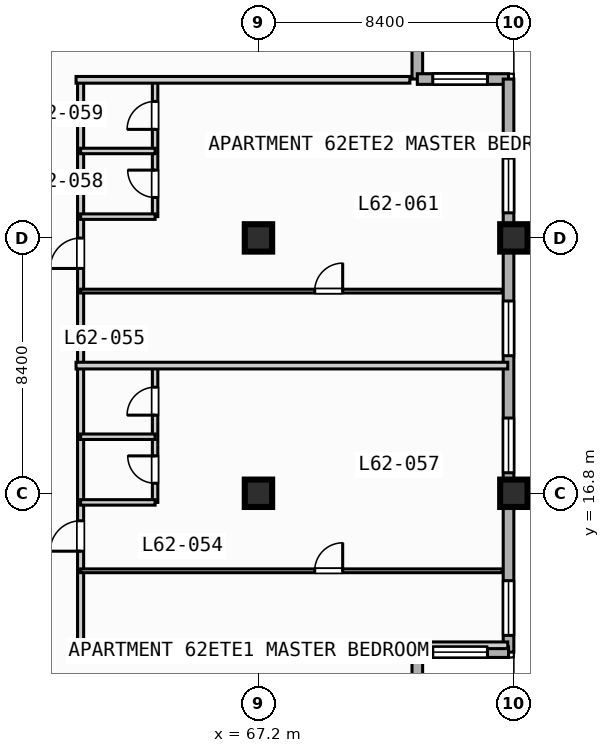
"""IFC4 building model, lengths in metres.
Left out: names, types, materials, properties, quantities, classifications, styles, units other than length and angle.
Written with IfcOpenShell. Run it as: python <this file> out.ifc"""

import sys

from ifc_helpers import new_model, si_unit, direction, frame, frame_2d, origin, origin_2d, place, context, subcontext, project, spatial, rectangle, extrude, element, fill, save


model = new_model("IFC4")
c1 = context("Model", 3, precision=1e-05, world=origin(), true_north=direction((0.0, 1.0)))
c2 = subcontext(c1, "Body", "Model", "MODEL_VIEW")
j1 = project(units=[si_unit("LENGTHUNIT", "METRE"), si_unit("PLANEANGLEUNIT", "RADIAN")], contexts=[c1])
p1 = place(None, origin())
s1 = spatial("IfcSite", under=j1, at=p1, CompositionType="ELEMENT")
p2 = place(p1, origin())
s2 = spatial("IfcBuilding", under=s1, at=p2, CompositionType="ELEMENT")
p3 = place(p2, frame((0.0, 0.0, 252.7)))
s3 = spatial("IfcBuildingStorey", under=s2, at=p3, CompositionType="ELEMENT", Elevation=252.7)
for number, where, z_axis, x_axis in (
    (1, (67.2, 16.8, 0.0), (0.0, 0.0, 1.0), (1.0, 0.0, 0.0)),
    (2, (67.2, 25.2, 0.0), (0.0, 0.0, 1.0), (1.0, 0.0, 0.0)),
    (3, (75.6, 16.8, 0.0), (0.0, 0.0, 1.0), (1.0, 0.0, 0.0)),
    (4, (75.6, 25.2, 0.0), (0.0, 0.0, 1.0), (1.0, 0.0, 0.0)),
):
    element("IfcColumn", number, at=place(p3, frame(where, z_axis=z_axis, x_axis=x_axis)), inside=s3, PredefinedType="COLUMN", context=c2, shape_type="SweptSolid", body=[
        extrude(rectangle(XDim=0.9, YDim=0.9, at=origin_2d()), origin(), (0.0, 0.0, 1.0), 3.7),
    ])
p4 = place(p3, frame((72.425, 33.425, 0.0), z_axis=(0.0, 0.0, 1.0), x_axis=(0.0, -1.0, 0.0)))
e5 = element("IfcWall", 5, at=p4, inside=s3, PredefinedType="STANDARD", context=c2, shape_type="SweptSolid", body=[
    extrude(rectangle(XDim=3.0, YDim=0.35, at=frame_2d((1.5, 0.0))), origin(), (0.0, 0.0, 1.0), 3.47),
])
p5 = place(p3, frame((72.425, 30.425, 0.0), z_axis=(0.0, 0.0, 1.0), x_axis=(1.0, 0.0, 0.0)))
e6 = element("IfcWall", 6, at=p5, inside=s3, PredefinedType="STANDARD", context=c2, shape_type="SweptSolid", body=[
    extrude(rectangle(XDim=3.0, YDim=0.35, at=frame_2d((1.5, 0.0))), origin(), (0.0, 0.0, 1.0), 3.47),
])
p6 = place(p5, frame((0.508, 0.0, 0.85)))
e7 = element("IfcOpeningElement", 7, at=p6, cuts=e6, PredefinedType="OPENING", context=c2, shape_type="SweptSolid", body=[
    extrude(rectangle(XDim=1.8, YDim=1.8, at=frame_2d((0.9, 0.9))), frame((0.0, 0.185, 0.0), z_axis=(0.0, -1.0, 0.0), x_axis=(1.0, 0.0, 0.0)), (0.0, 0.0, 1.0), 0.37),
])
p7 = place(p3, frame((75.425, 30.425, 0.0), z_axis=(0.0, 0.0, 1.0), x_axis=(0.0, -1.0, 0.0)))
e8 = element("IfcWall", 8, at=p7, inside=s3, PredefinedType="STANDARD", context=c2, shape_type="SweptSolid", body=[
    extrude(rectangle(XDim=18.85, YDim=0.35, at=frame_2d((9.425, 0.0))), origin(), (0.0, 0.0, 1.0), 3.47),
])
p8 = place(p7, frame((16.5, 0.0, 0.85)))
e9 = element("IfcOpeningElement", 9, at=p8, cuts=e8, PredefinedType="OPENING", context=c2, shape_type="SweptSolid", body=[
    extrude(rectangle(XDim=1.8, YDim=1.8, at=frame_2d((0.9, 0.9))), frame((0.0, 0.185, 0.0), z_axis=(0.0, -1.0, 0.0), x_axis=(1.0, 0.0, 0.0)), (0.0, 0.0, 1.0), 0.37),
])
p9 = place(p7, frame((11.15, 0.0, 0.85)))
e10 = element("IfcOpeningElement", 10, at=p9, cuts=e8, PredefinedType="OPENING", context=c2, shape_type="SweptSolid", body=[
    extrude(rectangle(XDim=1.8, YDim=1.8, at=frame_2d((0.9, 0.9))), frame((0.0, 0.185, 0.0), z_axis=(0.0, -1.0, 0.0), x_axis=(1.0, 0.0, 0.0)), (0.0, 0.0, 1.0), 0.37),
])
p10 = place(p7, frame((7.3, 0.0, 0.85)))
e11 = element("IfcOpeningElement", 11, at=p10, cuts=e8, PredefinedType="OPENING", context=c2, shape_type="SweptSolid", body=[
    extrude(rectangle(XDim=1.8, YDim=1.8, at=frame_2d((0.9, 0.9))), frame((0.0, 0.185, 0.0), z_axis=(0.0, -1.0, 0.0), x_axis=(1.0, 0.0, 0.0)), (0.0, 0.0, 1.0), 0.37),
])
p11 = place(p7, frame((2.6, 0.0, 0.85)))
e12 = element("IfcOpeningElement", 12, at=p11, cuts=e8, PredefinedType="OPENING", context=c2, shape_type="SweptSolid", body=[
    extrude(rectangle(XDim=1.8, YDim=1.8, at=frame_2d((0.9, 0.9))), frame((0.0, 0.185, 0.0), z_axis=(0.0, -1.0, 0.0), x_axis=(1.0, 0.0, 0.0)), (0.0, 0.0, 1.0), 0.37),
])
p12 = place(p3, frame((75.425, 11.575, 0.0), z_axis=(0.0, 0.0, 1.0), x_axis=(-1.0, 0.0, 0.0)))
e13 = element("IfcWall", 13, at=p12, inside=s3, PredefinedType="STANDARD", context=c2, shape_type="SweptSolid", body=[
    extrude(rectangle(XDim=3.0, YDim=0.35, at=frame_2d((1.5, 0.0))), origin(), (0.0, 0.0, 1.0), 3.47),
])
p13 = place(p12, frame((0.692, 0.0, 0.85)))
e14 = element("IfcOpeningElement", 14, at=p13, cuts=e13, PredefinedType="OPENING", context=c2, shape_type="SweptSolid", body=[
    extrude(rectangle(XDim=1.8, YDim=1.8, at=frame_2d((0.9, 0.9))), frame((0.0, 0.185, 0.0), z_axis=(0.0, -1.0, 0.0), x_axis=(1.0, 0.0, 0.0)), (0.0, 0.0, 1.0), 0.37),
])
p14 = place(p3, frame((72.425, 11.575, 0.0), z_axis=(0.0, 0.0, 1.0), x_axis=(0.0, -1.0, 0.0)))
e15 = element("IfcWall", 15, at=p14, inside=s3, PredefinedType="STANDARD", context=c2, shape_type="SweptSolid", body=[
    extrude(rectangle(XDim=3.0, YDim=0.35, at=frame_2d((1.5, 0.0))), origin(), (0.0, 0.0, 1.0), 3.47),
])
p15 = place(p3, frame((61.35, 11.8, 0.0), z_axis=(0.0, 0.0, 1.0), x_axis=(0.0, 1.0, 0.0)))
e16 = element("IfcWall", 16, at=p15, inside=s3, PredefinedType="PARTITIONING", context=c2, shape_type="SweptSolid", body=[
    extrude(rectangle(XDim=18.6, YDim=0.2, at=frame_2d((9.3, 0.0))), origin(), (0.0, 0.0, 1.0), 3.47),
])
p16 = place(p15, frame((3.095, 0.0, 0.0)))
e17 = element("IfcOpeningElement", 17, at=p16, cuts=e16, PredefinedType="OPENING", context=c2, shape_type="SweptSolid", body=[
    extrude(rectangle(XDim=1.0, YDim=2.15, at=frame_2d((0.5, 1.075))), frame((0.0, 0.11, 0.0), z_axis=(0.0, -1.0, 0.0), x_axis=(1.0, 0.0, 0.0)), (0.0, 0.0, 1.0), 0.22),
])
p17 = place(p15, frame((12.395, 0.0, 0.0)))
e18 = element("IfcOpeningElement", 18, at=p17, cuts=e16, PredefinedType="OPENING", context=c2, shape_type="SweptSolid", body=[
    extrude(rectangle(XDim=1.0, YDim=2.15, at=frame_2d((0.5, 1.075))), frame((0.0, 0.11, 0.0), z_axis=(0.0, -1.0, 0.0), x_axis=(1.0, 0.0, 0.0)), (0.0, 0.0, 1.0), 0.22),
])
p18 = place(p3, frame((61.2, 11.8, 0.0), z_axis=(0.0, 0.0, 1.0), x_axis=(1.0, 0.0, 0.0)))
e19 = element("IfcWall", 19, at=p18, inside=s3, PredefinedType="PARTITIONING", context=c2, shape_type="SweptSolid", body=[
    extrude(rectangle(XDim=14.2, YDim=0.22, at=frame_2d((7.1, 0.0))), origin(), (0.0, 0.0, 1.0), 3.47),
])
p19 = place(p3, frame((63.8, 16.5, 0.0), z_axis=(0.0, 0.0, 1.0), x_axis=(0.0, 1.0, 0.0)))
e20 = element("IfcWall", 20, at=p19, inside=s3, PredefinedType="PLUMBINGWALL", context=c2, shape_type="SweptSolid", body=[
    extrude(rectangle(XDim=4.5, YDim=0.18, at=frame_2d((2.25, 0.0))), origin(), (0.0, 0.0, 1.0), 3.47),
])
p20 = place(p19, frame((0.63, 0.0, 0.0)))
e21 = element("IfcOpeningElement", 21, at=p20, cuts=e20, PredefinedType="OPENING", context=c2, shape_type="SweptSolid", body=[
    extrude(rectangle(XDim=0.9, YDim=2.1, at=frame_2d((0.45, 1.05))), frame((0.0, 0.1, 0.0), z_axis=(0.0, -1.0, 0.0), x_axis=(1.0, 0.0, 0.0)), (0.0, 0.0, 1.0), 0.2),
])
p21 = place(p19, frame((2.87, 0.0, 0.0)))
e22 = element("IfcOpeningElement", 22, at=p21, cuts=e20, PredefinedType="OPENING", context=c2, shape_type="SweptSolid", body=[
    extrude(rectangle(XDim=0.92, YDim=2.1, at=frame_2d((0.46, 1.05))), frame((0.0, 0.1, 0.0), z_axis=(0.0, -1.0, 0.0), x_axis=(1.0, 0.0, 0.0)), (0.0, 0.0, 1.0), 0.2),
])
for number, where, z_axis, x_axis in (
    (23, (61.35, 16.5, 0.0), (0.0, 0.0, 1.0), (1.0, 0.0, 0.0)),
    (24, (61.35, 18.66, 0.0), (0.0, 0.0, 1.0), (1.0, 0.0, 0.0)),
):
    element("IfcWall", number, at=place(p3, frame(where, z_axis=z_axis, x_axis=x_axis)), inside=s3, PredefinedType="PLUMBINGWALL", context=c2, shape_type="SweptSolid", body=[
        extrude(rectangle(XDim=2.45, YDim=0.18, at=frame_2d((1.225, 0.0))), origin(), (0.0, 0.0, 1.0), 3.47),
    ])
p22 = place(p3, frame((61.35, 14.25, 0.0), z_axis=(0.0, 0.0, 1.0), x_axis=(1.0, 0.0, 0.0)))
e25 = element("IfcWall", 25, at=p22, inside=s3, PredefinedType="PARTITIONING", context=c2, shape_type="SweptSolid", body=[
    extrude(rectangle(XDim=13.87, YDim=0.125, at=frame_2d((6.935, 0.0))), origin(), (0.0, 0.0, 1.0), 3.47),
])
p23 = place(p22, frame((7.7, 0.0, 0.0)))
e26 = element("IfcOpeningElement", 26, at=p23, cuts=e25, PredefinedType="OPENING", context=c2, shape_type="SweptSolid", body=[
    extrude(rectangle(XDim=0.92, YDim=2.1, at=frame_2d((0.46, 1.05))), frame((0.0, 0.073, 0.0), z_axis=(0.0, -1.0, 0.0), x_axis=(1.0, 0.0, 0.0)), (0.0, 0.0, 1.0), 0.145),
])
p24 = place(p3, frame((61.2, 21.0, 0.0), z_axis=(0.0, 0.0, 1.0), x_axis=(1.0, 0.0, 0.0)))
e27 = element("IfcWall", 27, at=p24, inside=s3, PredefinedType="PARTITIONING", context=c2, shape_type="SweptSolid", body=[
    extrude(rectangle(XDim=14.2, YDim=0.22, at=frame_2d((7.1, 0.0))), origin(), (0.0, 0.0, 1.0), 3.47),
])
p25 = place(p3, frame((63.8, 25.9, 0.0), z_axis=(0.0, 0.0, 1.0), x_axis=(0.0, 1.0, 0.0)))
e28 = element("IfcWall", 28, at=p25, inside=s3, PredefinedType="PLUMBINGWALL", context=c2, shape_type="SweptSolid", body=[
    extrude(rectangle(XDim=4.5, YDim=0.18, at=frame_2d((2.25, 0.0))), origin(), (0.0, 0.0, 1.0), 3.47),
])
p26 = place(p25, frame((0.63, 0.0, 0.0)))
e29 = element("IfcOpeningElement", 29, at=p26, cuts=e28, PredefinedType="OPENING", context=c2, shape_type="SweptSolid", body=[
    extrude(rectangle(XDim=0.9, YDim=2.1, at=frame_2d((0.45, 1.05))), frame((0.0, 0.1, 0.0), z_axis=(0.0, -1.0, 0.0), x_axis=(1.0, 0.0, 0.0)), (0.0, 0.0, 1.0), 0.2),
])
p27 = place(p25, frame((2.87, 0.0, 0.0)))
e30 = element("IfcOpeningElement", 30, at=p27, cuts=e28, PredefinedType="OPENING", context=c2, shape_type="SweptSolid", body=[
    extrude(rectangle(XDim=0.92, YDim=2.1, at=frame_2d((0.46, 1.05))), frame((0.0, 0.1, 0.0), z_axis=(0.0, -1.0, 0.0), x_axis=(1.0, 0.0, 0.0)), (0.0, 0.0, 1.0), 0.2),
])
for number, where, z_axis, x_axis in (
    (31, (61.35, 25.9, 0.0), (0.0, 0.0, 1.0), (1.0, 0.0, 0.0)),
    (32, (61.35, 28.06, 0.0), (0.0, 0.0, 1.0), (1.0, 0.0, 0.0)),
):
    element("IfcWall", number, at=place(p3, frame(where, z_axis=z_axis, x_axis=x_axis)), inside=s3, PredefinedType="PLUMBINGWALL", context=c2, shape_type="SweptSolid", body=[
        extrude(rectangle(XDim=2.45, YDim=0.18, at=frame_2d((1.225, 0.0))), origin(), (0.0, 0.0, 1.0), 3.47),
    ])
p28 = place(p3, frame((61.35, 23.45, 0.0), z_axis=(0.0, 0.0, 1.0), x_axis=(1.0, 0.0, 0.0)))
e33 = element("IfcWall", 33, at=p28, inside=s3, PredefinedType="PARTITIONING", context=c2, shape_type="SweptSolid", body=[
    extrude(rectangle(XDim=13.87, YDim=0.125, at=frame_2d((6.935, 0.0))), origin(), (0.0, 0.0, 1.0), 3.47),
])
p29 = place(p28, frame((7.7, 0.0, 0.0)))
e34 = element("IfcOpeningElement", 34, at=p29, cuts=e33, PredefinedType="OPENING", context=c2, shape_type="SweptSolid", body=[
    extrude(rectangle(XDim=0.92, YDim=2.1, at=frame_2d((0.46, 1.05))), frame((0.0, 0.073, 0.0), z_axis=(0.0, -1.0, 0.0), x_axis=(1.0, 0.0, 0.0)), (0.0, 0.0, 1.0), 0.145),
])
p30 = place(p3, frame((61.2, 30.4, 0.0), z_axis=(0.0, 0.0, 1.0), x_axis=(1.0, 0.0, 0.0)))
e35 = element("IfcWall", 35, at=p30, inside=s3, PredefinedType="PARTITIONING", context=c2, shape_type="SweptSolid", body=[
    extrude(rectangle(XDim=10.98, YDim=0.22, at=frame_2d((5.49, 0.0))), origin(), (0.0, 0.0, 1.0), 3.47),
])
p31 = place(p6, origin())
e36 = element("IfcWindow", 36, at=p31, inside=s3, PartitioningType="SINGLE_PANEL", PredefinedType="WINDOW", context=c2, shape_type="SweptSolid", body=[
    extrude(rectangle(XDim=1.8, YDim=1.8, at=frame_2d((0.9, 0.9))), frame((0.0, 0.03, 0.0), z_axis=(0.0, -1.0, 0.0), x_axis=(1.0, 0.0, 0.0)), (0.0, 0.0, 1.0), 0.06),
])
fill(e7, e36)
p32 = place(p8, origin())
e37 = element("IfcWindow", 37, at=p32, inside=s3, PartitioningType="SINGLE_PANEL", PredefinedType="WINDOW", context=c2, shape_type="SweptSolid", body=[
    extrude(rectangle(XDim=1.8, YDim=1.8, at=frame_2d((0.9, 0.9))), frame((0.0, 0.03, 0.0), z_axis=(0.0, -1.0, 0.0), x_axis=(1.0, 0.0, 0.0)), (0.0, 0.0, 1.0), 0.06),
])
fill(e9, e37)
p33 = place(p9, origin())
e38 = element("IfcWindow", 38, at=p33, inside=s3, PartitioningType="SINGLE_PANEL", PredefinedType="WINDOW", context=c2, shape_type="SweptSolid", body=[
    extrude(rectangle(XDim=1.8, YDim=1.8, at=frame_2d((0.9, 0.9))), frame((0.0, 0.03, 0.0), z_axis=(0.0, -1.0, 0.0), x_axis=(1.0, 0.0, 0.0)), (0.0, 0.0, 1.0), 0.06),
])
fill(e10, e38)
p34 = place(p10, origin())
e39 = element("IfcWindow", 39, at=p34, inside=s3, PartitioningType="SINGLE_PANEL", PredefinedType="WINDOW", context=c2, shape_type="SweptSolid", body=[
    extrude(rectangle(XDim=1.8, YDim=1.8, at=frame_2d((0.9, 0.9))), frame((0.0, 0.03, 0.0), z_axis=(0.0, -1.0, 0.0), x_axis=(1.0, 0.0, 0.0)), (0.0, 0.0, 1.0), 0.06),
])
fill(e11, e39)
p35 = place(p11, origin())
e40 = element("IfcWindow", 40, at=p35, inside=s3, PartitioningType="SINGLE_PANEL", PredefinedType="WINDOW", context=c2, shape_type="SweptSolid", body=[
    extrude(rectangle(XDim=1.8, YDim=1.8, at=frame_2d((0.9, 0.9))), frame((0.0, 0.03, 0.0), z_axis=(0.0, -1.0, 0.0), x_axis=(1.0, 0.0, 0.0)), (0.0, 0.0, 1.0), 0.06),
])
fill(e12, e40)
p36 = place(p13, origin())
e41 = element("IfcWindow", 41, at=p36, inside=s3, PartitioningType="SINGLE_PANEL", PredefinedType="WINDOW", context=c2, shape_type="SweptSolid", body=[
    extrude(rectangle(XDim=1.8, YDim=1.8, at=frame_2d((0.9, 0.9))), frame((0.0, 0.03, 0.0), z_axis=(0.0, -1.0, 0.0), x_axis=(1.0, 0.0, 0.0)), (0.0, 0.0, 1.0), 0.06),
])
fill(e14, e41)
p37 = place(p16, origin())
e42 = element("IfcDoor", 42, at=p37, inside=s3, OperationType="SINGLE_SWING_LEFT", PredefinedType="DOOR", context=c2, shape_type="SweptSolid", body=[
    extrude(rectangle(XDim=1.0, YDim=2.15, at=frame_2d((0.5, 1.075))), frame((0.0, 0.025, 0.0), z_axis=(0.0, -1.0, 0.0), x_axis=(1.0, 0.0, 0.0)), (0.0, 0.0, 1.0), 0.05),
])
fill(e17, e42)
p38 = place(p17, origin())
e43 = element("IfcDoor", 43, at=p38, inside=s3, OperationType="SINGLE_SWING_LEFT", PredefinedType="DOOR", context=c2, shape_type="SweptSolid", body=[
    extrude(rectangle(XDim=1.0, YDim=2.15, at=frame_2d((0.5, 1.075))), frame((0.0, 0.025, 0.0), z_axis=(0.0, -1.0, 0.0), x_axis=(1.0, 0.0, 0.0)), (0.0, 0.0, 1.0), 0.05),
])
fill(e18, e43)
p39 = place(p20, origin())
e44 = element("IfcDoor", 44, at=p39, inside=s3, OperationType="SINGLE_SWING_RIGHT", PredefinedType="DOOR", context=c2, shape_type="SweptSolid", body=[
    extrude(rectangle(XDim=0.9, YDim=2.1, at=frame_2d((0.45, 1.05))), frame((0.0, 0.025, 0.0), z_axis=(0.0, -1.0, 0.0), x_axis=(1.0, 0.0, 0.0)), (0.0, 0.0, 1.0), 0.05),
])
fill(e21, e44)
p40 = place(p21, origin())
e45 = element("IfcDoor", 45, at=p40, inside=s3, OperationType="SINGLE_SWING_LEFT", PredefinedType="DOOR", context=c2, shape_type="SweptSolid", body=[
    extrude(rectangle(XDim=0.92, YDim=2.1, at=frame_2d((0.46, 1.05))), frame((0.0, 0.025, 0.0), z_axis=(0.0, -1.0, 0.0), x_axis=(1.0, 0.0, 0.0)), (0.0, 0.0, 1.0), 0.05),
])
fill(e22, e45)
p41 = place(p23, origin())
e46 = element("IfcDoor", 46, at=p41, inside=s3, OperationType="SINGLE_SWING_RIGHT", PredefinedType="DOOR", context=c2, shape_type="SweptSolid", body=[
    extrude(rectangle(XDim=0.92, YDim=2.1, at=frame_2d((0.46, 1.05))), frame((0.0, 0.025, 0.0), z_axis=(0.0, -1.0, 0.0), x_axis=(1.0, 0.0, 0.0)), (0.0, 0.0, 1.0), 0.05),
])
fill(e26, e46)
p42 = place(p26, origin())
e47 = element("IfcDoor", 47, at=p42, inside=s3, OperationType="SINGLE_SWING_RIGHT", PredefinedType="DOOR", context=c2, shape_type="SweptSolid", body=[
    extrude(rectangle(XDim=0.9, YDim=2.1, at=frame_2d((0.45, 1.05))), frame((0.0, 0.025, 0.0), z_axis=(0.0, -1.0, 0.0), x_axis=(1.0, 0.0, 0.0)), (0.0, 0.0, 1.0), 0.05),
])
fill(e29, e47)
p43 = place(p27, origin())
e48 = element("IfcDoor", 48, at=p43, inside=s3, OperationType="SINGLE_SWING_LEFT", PredefinedType="DOOR", context=c2, shape_type="SweptSolid", body=[
    extrude(rectangle(XDim=0.92, YDim=2.1, at=frame_2d((0.46, 1.05))), frame((0.0, 0.025, 0.0), z_axis=(0.0, -1.0, 0.0), x_axis=(1.0, 0.0, 0.0)), (0.0, 0.0, 1.0), 0.05),
])
fill(e30, e48)
p44 = place(p29, origin())
e49 = element("IfcDoor", 49, at=p44, inside=s3, OperationType="SINGLE_SWING_RIGHT", PredefinedType="DOOR", context=c2, shape_type="SweptSolid", body=[
    extrude(rectangle(XDim=0.92, YDim=2.1, at=frame_2d((0.46, 1.05))), frame((0.0, 0.025, 0.0), z_axis=(0.0, -1.0, 0.0), x_axis=(1.0, 0.0, 0.0)), (0.0, 0.0, 1.0), 0.05),
])
fill(e34, e49)
save(model, sys.argv[1])
